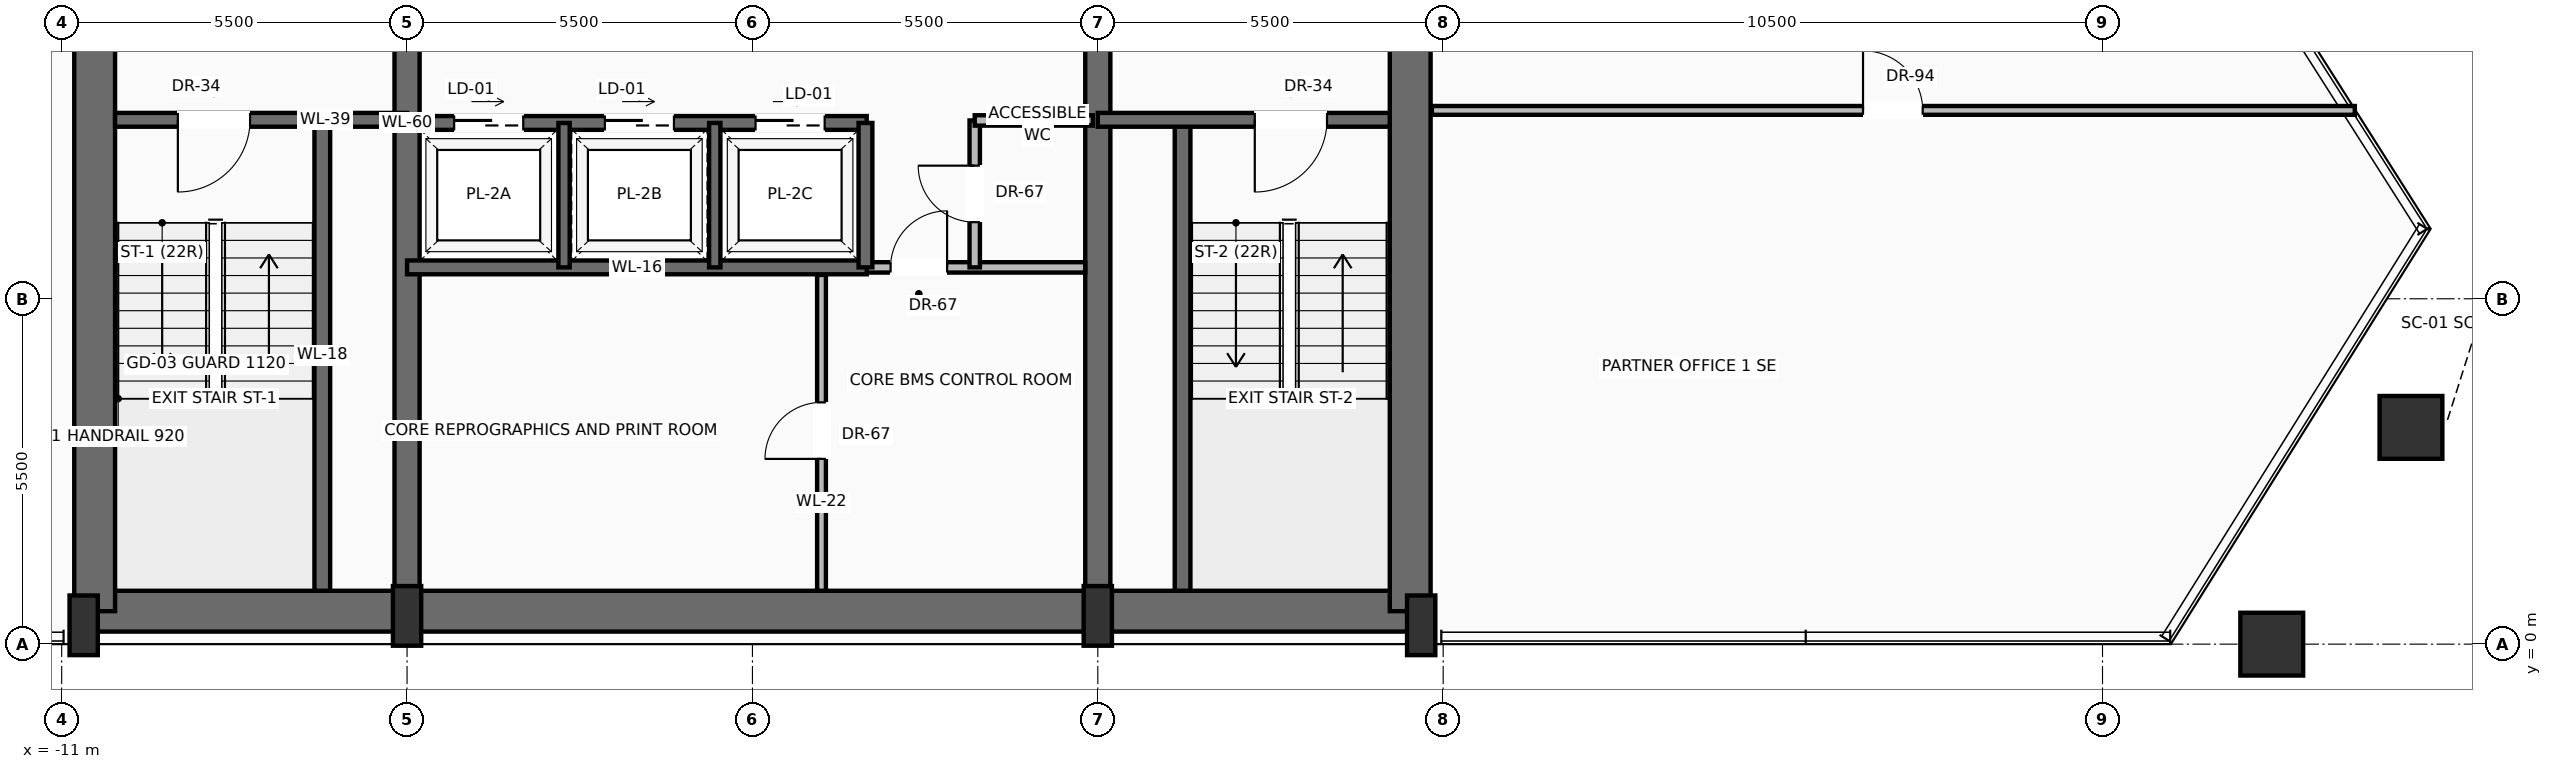
"""IFC4 building model, lengths in metres.
Left out: names, types, materials, properties, quantities, classifications, styles, units other than length and angle.
Written with IfcOpenShell. Run it as: python <this file> out.ifc"""

import sys

from ifc_helpers import new_model, si_unit, direction, frame, frame_2d, origin, origin_2d, place, context, subcontext, project, spatial, rectangle, hollow_rectangle, extrude, source, transform, mapped, element, fill, save


model = new_model("IFC4")
c1 = context("Model", 3, precision=1e-05, world=origin(), true_north=direction((0.0, 1.0)))
c2 = subcontext(c1, "Body", "Model", "MODEL_VIEW")
j1 = project(units=[si_unit("LENGTHUNIT", "METRE"), si_unit("PLANEANGLEUNIT", "RADIAN")], contexts=[c1])
p1 = place(None, origin())
s1 = spatial("IfcSite", under=j1, at=p1, CompositionType="ELEMENT")
p2 = place(p1, origin())
s2 = spatial("IfcBuilding", under=s1, at=p2, CompositionType="ELEMENT")
p3 = place(p2, frame((0.0, 0.0, 178.4)))
s3 = spatial("IfcBuildingStorey", under=s2, at=p3, CompositionType="ELEMENT", Elevation=178.4)
p4 = place(p3, frame((-10.65, 0.525, 0.0), z_axis=(0.0, 0.0, 1.0), x_axis=(1.0, 0.0, 0.0)))
e1 = element("IfcWall", 1, at=p4, inside=s3, PredefinedType="SHEAR", context=c2, shape_type="SweptSolid", body=[
    extrude(rectangle(XDim=21.3, YDim=0.65, at=frame_2d((10.65, 0.0))), origin(), (0.0, 0.0, 1.0), 3.47),
])
for number, where, z_axis, x_axis in (
    (2, (-10.475, 0.525, 0.0), (0.0, 0.0, 1.0), (0.0, 1.0, 0.0)),
    (3, (10.475, 0.525, 0.0), (0.0, 0.0, 1.0), (0.0, 1.0, 0.0)),
):
    element("IfcWall", number, at=place(p3, frame(where, z_axis=z_axis, x_axis=x_axis)), inside=s3, PredefinedType="SHEAR", context=c2, shape_type="SweptSolid", body=[
        extrude(rectangle(XDim=15.55, YDim=0.65, at=frame_2d((7.775, 0.0))), origin(), (0.0, 0.0, 1.0), 3.47),
    ])
p5 = place(p3, frame((-5.5, 0.525, 0.0), z_axis=(0.0, 0.0, 1.0), x_axis=(0.0, 1.0, 0.0)))
e4 = element("IfcWall", 4, at=p5, inside=s3, PredefinedType="SHEAR", context=c2, shape_type="SweptSolid", body=[
    extrude(rectangle(XDim=15.55, YDim=0.4, at=frame_2d((7.775, 0.0))), origin(), (0.0, 0.0, 1.0), 3.47),
])
p6 = place(p5, frame((8.975, 0.0, 0.0)))
e5 = element("IfcOpeningElement", 5, at=p6, cuts=e4, PredefinedType="OPENING", context=c2, shape_type="SweptSolid", body=[
    extrude(rectangle(XDim=1.1, YDim=2.2, at=frame_2d((0.55, 1.1))), frame((0.0, 0.21, 0.0), z_axis=(0.0, -1.0, 0.0), x_axis=(1.0, 0.0, 0.0)), (0.0, 0.0, 1.0), 0.42),
])
p7 = place(p3, frame((5.5, 0.525, 0.0), z_axis=(0.0, 0.0, 1.0), x_axis=(0.0, 1.0, 0.0)))
e6 = element("IfcWall", 6, at=p7, inside=s3, PredefinedType="SHEAR", context=c2, shape_type="SweptSolid", body=[
    extrude(rectangle(XDim=15.55, YDim=0.4, at=frame_2d((7.775, 0.0))), origin(), (0.0, 0.0, 1.0), 3.47),
])
p8 = place(p7, frame((8.975, 0.0, 0.0)))
e7 = element("IfcOpeningElement", 7, at=p8, cuts=e6, PredefinedType="OPENING", context=c2, shape_type="SweptSolid", body=[
    extrude(rectangle(XDim=1.1, YDim=2.2, at=frame_2d((0.55, 1.1))), frame((0.0, 0.21, 0.0), z_axis=(0.0, -1.0, 0.0), x_axis=(1.0, 0.0, 0.0)), (0.0, 0.0, 1.0), 0.42),
])
m1 = source(origin(), c2, "Body", "SweptSolid", [
    extrude(rectangle(XDim=0.45, YDim=0.95, at=origin_2d()), origin(), (0.0, 0.0, 1.0), 3.7),
])
for number, where, z_axis, x_axis in (
    (8, (-10.65, 0.3, 0.0), (0.0, 0.0, 1.0), (1.0, 0.0, 0.0)),
    (9, (-5.5, 0.45, 0.0), (0.0, 0.0, 1.0), (1.0, 0.0, 0.0)),
    (10, (5.5, 0.45, 0.0), (0.0, 0.0, 1.0), (1.0, 0.0, 0.0)),
    (11, (10.65, 0.3, 0.0), (0.0, 0.0, 1.0), (1.0, 0.0, 0.0)),
):
    element("IfcColumn", number, at=place(p3, frame(where, z_axis=z_axis, x_axis=x_axis)), inside=s3, PredefinedType="PILASTER", context=c2, shape_type="MappedRepresentation", body=[
        mapped(m1, transform((0.0, 0.0, 0.0), scale=1.0)),
    ])
m2 = source(origin(), c2, "Body", "SweptSolid", [
    extrude(hollow_rectangle(XDim=1.0, YDim=1.0, WallThickness=0.05, at=origin_2d()), origin(), (0.0, 0.0, 1.0), 3.691),
])
p9 = place(p3, frame((24.195, 0.0, 0.004), z_axis=(0.005886141416, 0.0, 0.99998267652), x_axis=(0.0, 1.0, 0.0)))
e12 = element("IfcColumn", 12, at=p9, inside=s3, PredefinedType="COLUMN", context=c2, shape_type="MappedRepresentation", body=[
    mapped(m2, transform((0.0, 0.0, 0.0), scale=1.0)),
])
m3 = source(origin(), c2, "Body", "SweptSolid", [
    extrude(hollow_rectangle(XDim=1.0, YDim=1.0, WallThickness=0.05, at=origin_2d()), origin(), (0.0, 0.0, 1.0), 3.692),
])
p10 = place(p3, frame((26.412, 3.452, 0.004), z_axis=(-0.005687114639, -0.014812949759, 0.999874108699), x_axis=(0.933560267925, -0.358420460007, 0.0)))
e13 = element("IfcColumn", 13, at=p10, inside=s3, PredefinedType="COLUMN", context=c2, shape_type="MappedRepresentation", body=[
    mapped(m3, transform((0.0, 0.0, 0.0), scale=1.0)),
])
p11 = place(p3, frame((-6.85, 0.85, 0.0), z_axis=(0.0, 0.0, 1.0), x_axis=(0.0, 1.0, 0.0)))
e14 = element("IfcWall", 14, at=p11, inside=s3, PredefinedType="SOLIDWALL", context=c2, shape_type="SweptSolid", body=[
    extrude(rectangle(XDim=7.5, YDim=0.25, at=frame_2d((3.75, 0.0))), origin(), (0.0, 0.0, 1.0), 3.47),
])
p12 = place(p3, frame((-5.5, 8.35, 0.0), z_axis=(0.0, 0.0, 1.0), x_axis=(-1.0, 0.0, 0.0)))
e15 = element("IfcWall", 15, at=p12, inside=s3, PredefinedType="SOLIDWALL", context=c2, shape_type="SweptSolid", body=[
    extrude(rectangle(XDim=4.65, YDim=0.22, at=frame_2d((2.325, 0.0))), origin(), (0.0, 0.0, 1.0), 3.47),
])
p13 = place(p12, frame((2.5, 0.0, 0.0)))
e16 = element("IfcOpeningElement", 16, at=p13, cuts=e15, PredefinedType="OPENING", context=c2, shape_type="SweptSolid", body=[
    extrude(rectangle(XDim=1.15, YDim=2.2, at=frame_2d((0.575, 1.1))), frame((0.0, 0.12, 0.0), z_axis=(0.0, -1.0, 0.0), x_axis=(1.0, 0.0, 0.0)), (0.0, 0.0, 1.0), 0.24),
])
p14 = place(p3, frame((6.85, 0.85, 0.0), z_axis=(0.0, 0.0, 1.0), x_axis=(0.0, 1.0, 0.0)))
e17 = element("IfcWall", 17, at=p14, inside=s3, PredefinedType="SOLIDWALL", context=c2, shape_type="SweptSolid", body=[
    extrude(rectangle(XDim=7.5, YDim=0.25, at=frame_2d((3.75, 0.0))), origin(), (0.0, 0.0, 1.0), 3.47),
])
p15 = place(p3, frame((10.15, 8.35, 0.0), z_axis=(0.0, 0.0, 1.0), x_axis=(-1.0, 0.0, 0.0)))
e18 = element("IfcWall", 18, at=p15, inside=s3, PredefinedType="SOLIDWALL", context=c2, shape_type="SweptSolid", body=[
    extrude(rectangle(XDim=4.65, YDim=0.22, at=frame_2d((2.325, 0.0))), origin(), (0.0, 0.0, 1.0), 3.47),
])
p16 = place(p15, frame((1.0, 0.0, 0.0)))
e19 = element("IfcOpeningElement", 19, at=p16, cuts=e18, PredefinedType="OPENING", context=c2, shape_type="SweptSolid", body=[
    extrude(rectangle(XDim=1.15, YDim=2.2, at=frame_2d((0.575, 1.1))), frame((0.0, 0.12, 0.0), z_axis=(0.0, -1.0, 0.0), x_axis=(1.0, 0.0, 0.0)), (0.0, 0.0, 1.0), 0.24),
])
p17 = place(p3, frame((1.82, 6.0, 0.0), z_axis=(0.0, 0.0, 1.0), x_axis=(1.0, 0.0, 0.0)))
e20 = element("IfcWall", 20, at=p17, inside=s3, PredefinedType="PARTITIONING", context=c2, shape_type="SweptSolid", body=[
    extrude(rectangle(XDim=3.48, YDim=0.165, at=frame_2d((1.74, 0.0))), origin(), (0.0, 0.0, 1.0), 3.462),
])
p18 = place(p17, frame((0.38, 0.0, 0.0)))
e21 = element("IfcOpeningElement", 21, at=p18, cuts=e20, PredefinedType="OPENING", context=c2, shape_type="SweptSolid", body=[
    extrude(rectangle(XDim=0.9, YDim=2.1, at=frame_2d((0.45, 1.05))), frame((0.0, 0.093, 0.0), z_axis=(0.0, -1.0, 0.0), x_axis=(1.0, 0.0, 0.0)), (0.0, 0.0, 1.0), 0.185),
])
p19 = place(p3, frame((1.1, 0.85, 0.0), z_axis=(0.0, 0.0, 1.0), x_axis=(0.0, 1.0, 0.0)))
e22 = element("IfcWall", 22, at=p19, inside=s3, PredefinedType="PARTITIONING", context=c2, shape_type="SweptSolid", body=[
    extrude(rectangle(XDim=5.03, YDim=0.14, at=frame_2d((2.515, 0.0))), origin(), (0.0, 0.0, 1.0), 3.462),
])
p20 = place(p19, frame((2.1, 0.0, 0.0)))
e23 = element("IfcOpeningElement", 23, at=p20, cuts=e22, PredefinedType="OPENING", context=c2, shape_type="SweptSolid", body=[
    extrude(rectangle(XDim=0.9, YDim=2.1, at=frame_2d((0.45, 1.05))), frame((0.0, 0.08, 0.0), z_axis=(0.0, -1.0, 0.0), x_axis=(1.0, 0.0, 0.0)), (0.0, 0.0, 1.0), 0.16),
])
p21 = place(p3, frame((3.54, 6.0, 0.0), z_axis=(0.0, 0.0, 1.0), x_axis=(0.0, 1.0, 0.0)))
e24 = element("IfcWall", 24, at=p21, inside=s3, PredefinedType="PARTITIONING", context=c2, shape_type="SweptSolid", body=[
    extrude(rectangle(XDim=2.34, YDim=0.165, at=frame_2d((1.17, 0.0))), origin(), (0.0, 0.0, 1.0), 3.462),
])
p22 = place(p21, frame((0.72, 0.0, 0.0)))
e25 = element("IfcOpeningElement", 25, at=p22, cuts=e24, PredefinedType="OPENING", context=c2, shape_type="SweptSolid", body=[
    extrude(rectangle(XDim=0.9, YDim=2.1, at=frame_2d((0.45, 1.05))), frame((0.0, 0.093, 0.0), z_axis=(0.0, -1.0, 0.0), x_axis=(1.0, 0.0, 0.0)), (0.0, 0.0, 1.0), 0.185),
])
p23 = place(p3, frame((3.54, 8.34, 0.0), z_axis=(0.0, 0.0, 1.0), x_axis=(1.0, 0.0, 0.0)))
e26 = element("IfcWall", 26, at=p23, inside=s3, PredefinedType="PARTITIONING", context=c2, shape_type="SweptSolid", body=[
    extrude(rectangle(XDim=1.88, YDim=0.165, at=frame_2d((0.94, 0.0))), origin(), (0.0, 0.0, 1.0), 3.462),
])
p24 = place(p3, frame((-5.5, 6.0, 0.0), z_axis=(0.0, 0.0, 1.0), x_axis=(1.0, 0.0, 0.0)))
e27 = element("IfcWall", 27, at=p24, inside=s3, PredefinedType="SOLIDWALL", context=c2, shape_type="SweptSolid", body=[
    extrude(rectangle(XDim=7.32, YDim=0.22, at=frame_2d((3.66, 0.0))), origin(), (0.0, 0.0, 1.0), 3.47),
])
p25 = place(p3, frame((-5.5, 8.3, 0.0), z_axis=(0.0, 0.0, 1.0), x_axis=(1.0, 0.0, 0.0)))
e28 = element("IfcWall", 28, at=p25, inside=s3, PredefinedType="SOLIDWALL", context=c2, shape_type="SweptSolid", body=[
    extrude(rectangle(XDim=7.32, YDim=0.22, at=frame_2d((3.66, 0.0))), origin(), (0.0, 0.0, 1.0), 3.47),
])
p26 = place(p25, frame((0.75, 0.0, 0.0)))
e29 = element("IfcOpeningElement", 29, at=p26, cuts=e28, PredefinedType="OPENING", context=c2, shape_type="SweptSolid", body=[
    extrude(rectangle(XDim=1.1, YDim=2.2, at=frame_2d((0.55, 1.1))), frame((0.0, 0.12, 0.0), z_axis=(0.0, -1.0, 0.0), x_axis=(1.0, 0.0, 0.0)), (0.0, 0.0, 1.0), 0.24),
])
p27 = place(p25, frame((3.15, 0.0, 0.0)))
e30 = element("IfcOpeningElement", 30, at=p27, cuts=e28, PredefinedType="OPENING", context=c2, shape_type="SweptSolid", body=[
    extrude(rectangle(XDim=1.1, YDim=2.2, at=frame_2d((0.55, 1.1))), frame((0.0, 0.12, 0.0), z_axis=(0.0, -1.0, 0.0), x_axis=(1.0, 0.0, 0.0)), (0.0, 0.0, 1.0), 0.24),
])
p28 = place(p25, frame((5.55, 0.0, 0.0)))
e31 = element("IfcOpeningElement", 31, at=p28, cuts=e28, PredefinedType="OPENING", context=c2, shape_type="SweptSolid", body=[
    extrude(rectangle(XDim=1.1, YDim=2.2, at=frame_2d((0.55, 1.1))), frame((0.0, 0.12, 0.0), z_axis=(0.0, -1.0, 0.0), x_axis=(1.0, 0.0, 0.0)), (0.0, 0.0, 1.0), 0.24),
])
p29 = place(p3, frame((1.8, 6.0, 0.0), z_axis=(0.0, 0.0, 1.0), x_axis=(0.0, 1.0, 0.0)))
e32 = element("IfcWall", 32, at=p29, inside=s3, PredefinedType="SOLIDWALL", context=c2, shape_type="SweptSolid", body=[
    extrude(rectangle(XDim=2.3, YDim=0.22, at=frame_2d((1.15, 0.0))), origin(), (0.0, 0.0, 1.0), 3.47),
])
for number, where, z_axis, x_axis in (
    (33, (-3.0, 6.0, 0.0), (0.0, 0.0, 1.0), (0.0, 1.0, 0.0)),
    (34, (-0.6, 6.0, 0.0), (0.0, 0.0, 1.0), (0.0, 1.0, 0.0)),
):
    element("IfcWall", number, at=place(p3, frame(where, z_axis=z_axis, x_axis=x_axis)), inside=s3, PredefinedType="SOLIDWALL", context=c2, shape_type="SweptSolid", body=[
        extrude(rectangle(XDim=2.3, YDim=0.18, at=frame_2d((1.15, 0.0))), origin(), (0.0, 0.0, 1.0), 3.47),
    ])
p30 = place(p3, frame((10.82, 8.5, 0.0), z_axis=(0.0, 0.0, 1.0), x_axis=(1.0, 0.0, 0.0)))
e35 = element("IfcWall", 35, at=p30, inside=s3, PredefinedType="PARTITIONING", context=c2, shape_type="SweptSolid", body=[
    extrude(rectangle(XDim=14.698, YDim=0.14, at=frame_2d((7.349, 0.0))), origin(), (0.0, 0.0, 1.0), 3.462),
])
p31 = place(p30, frame((6.866, 0.0, 0.0)))
e36 = element("IfcOpeningElement", 36, at=p31, cuts=e35, PredefinedType="OPENING", context=c2, shape_type="SweptSolid", body=[
    extrude(rectangle(XDim=0.95, YDim=2.2, at=frame_2d((0.475, 1.1))), frame((0.0, 0.08, 0.0), z_axis=(0.0, -1.0, 0.0), x_axis=(1.0, 0.0, 0.0)), (0.0, 0.0, 1.0), 0.16),
])
m4 = source(origin(), c2, "Body", "SweptSolid", [
    extrude(rectangle(XDim=1.15, YDim=2.2, at=frame_2d((0.575, 1.1))), frame((0.0, 0.025, 0.0), z_axis=(0.0, -1.0, 0.0), x_axis=(1.0, 0.0, 0.0)), (0.0, 0.0, 1.0), 0.05),
])
p32 = place(p13, origin())
e37 = element("IfcDoor", 37, at=p32, inside=s3, OperationType="SINGLE_SWING_RIGHT", PredefinedType="DOOR", context=c2, shape_type="MappedRepresentation", body=[
    mapped(m4, transform((0.0, 0.0, 0.0), scale=1.0)),
])
fill(e16, e37)
p33 = place(p16, origin())
e38 = element("IfcDoor", 38, at=p33, inside=s3, OperationType="SINGLE_SWING_RIGHT", PredefinedType="DOOR", context=c2, shape_type="MappedRepresentation", body=[
    mapped(m4, transform((0.0, 0.0, 0.0), scale=1.0)),
])
fill(e19, e38)
m5 = source(origin(), c2, "Body", "SweptSolid", [
    extrude(rectangle(XDim=0.9, YDim=2.1, at=frame_2d((0.45, 1.05))), frame((0.0, 0.025, 0.0), z_axis=(0.0, -1.0, 0.0), x_axis=(1.0, 0.0, 0.0)), (0.0, 0.0, 1.0), 0.05),
])
p34 = place(p18, origin())
e39 = element("IfcDoor", 39, at=p34, inside=s3, OperationType="SINGLE_SWING_RIGHT", PredefinedType="DOOR", context=c2, shape_type="MappedRepresentation", body=[
    mapped(m5, transform((0.0, 0.0, 0.0), scale=1.0)),
])
fill(e21, e39)
p35 = place(p20, origin())
e40 = element("IfcDoor", 40, at=p35, inside=s3, OperationType="SINGLE_SWING_LEFT", PredefinedType="DOOR", context=c2, shape_type="MappedRepresentation", body=[
    mapped(m5, transform((0.0, 0.0, 0.0), scale=1.0)),
])
fill(e23, e40)
p36 = place(p22, origin())
e41 = element("IfcDoor", 41, at=p36, inside=s3, OperationType="SINGLE_SWING_RIGHT", PredefinedType="DOOR", context=c2, shape_type="MappedRepresentation", body=[
    mapped(m5, transform((0.0, 0.0, 0.0), scale=1.0)),
])
fill(e25, e41)
m6 = source(origin(), c2, "Body", "SweptSolid", [
    extrude(rectangle(XDim=1.1, YDim=2.2, at=frame_2d((0.55, 1.1))), frame((0.0, 0.025, 0.0), z_axis=(0.0, -1.0, 0.0), x_axis=(1.0, 0.0, 0.0)), (0.0, 0.0, 1.0), 0.05),
])
p37 = place(p26, origin())
e42 = element("IfcDoor", 42, at=p37, inside=s3, OperationType="SLIDING_TO_LEFT", PredefinedType="DOOR", context=c2, shape_type="MappedRepresentation", body=[
    mapped(m6, transform((0.0, 0.0, 0.0), scale=1.0)),
])
fill(e29, e42)
p38 = place(p27, origin())
e43 = element("IfcDoor", 43, at=p38, inside=s3, OperationType="SLIDING_TO_LEFT", PredefinedType="DOOR", context=c2, shape_type="MappedRepresentation", body=[
    mapped(m6, transform((0.0, 0.0, 0.0), scale=1.0)),
])
fill(e30, e43)
p39 = place(p28, origin())
e44 = element("IfcDoor", 44, at=p39, inside=s3, OperationType="SLIDING_TO_LEFT", PredefinedType="DOOR", context=c2, shape_type="MappedRepresentation", body=[
    mapped(m6, transform((0.0, 0.0, 0.0), scale=1.0)),
])
fill(e31, e44)
m7 = source(origin(), c2, "Body", "SweptSolid", [
    extrude(rectangle(XDim=0.95, YDim=2.2, at=frame_2d((0.475, 1.1))), frame((0.0, 0.025, 0.0), z_axis=(0.0, -1.0, 0.0), x_axis=(1.0, 0.0, 0.0)), (0.0, 0.0, 1.0), 0.05),
])
p40 = place(p31, origin())
e45 = element("IfcDoor", 45, at=p40, inside=s3, OperationType="SINGLE_SWING_LEFT", PredefinedType="DOOR", context=c2, shape_type="MappedRepresentation", body=[
    mapped(m7, transform((0.0, 0.0, 0.0), scale=1.0)),
])
fill(e36, e45)
save(model, sys.argv[1])
